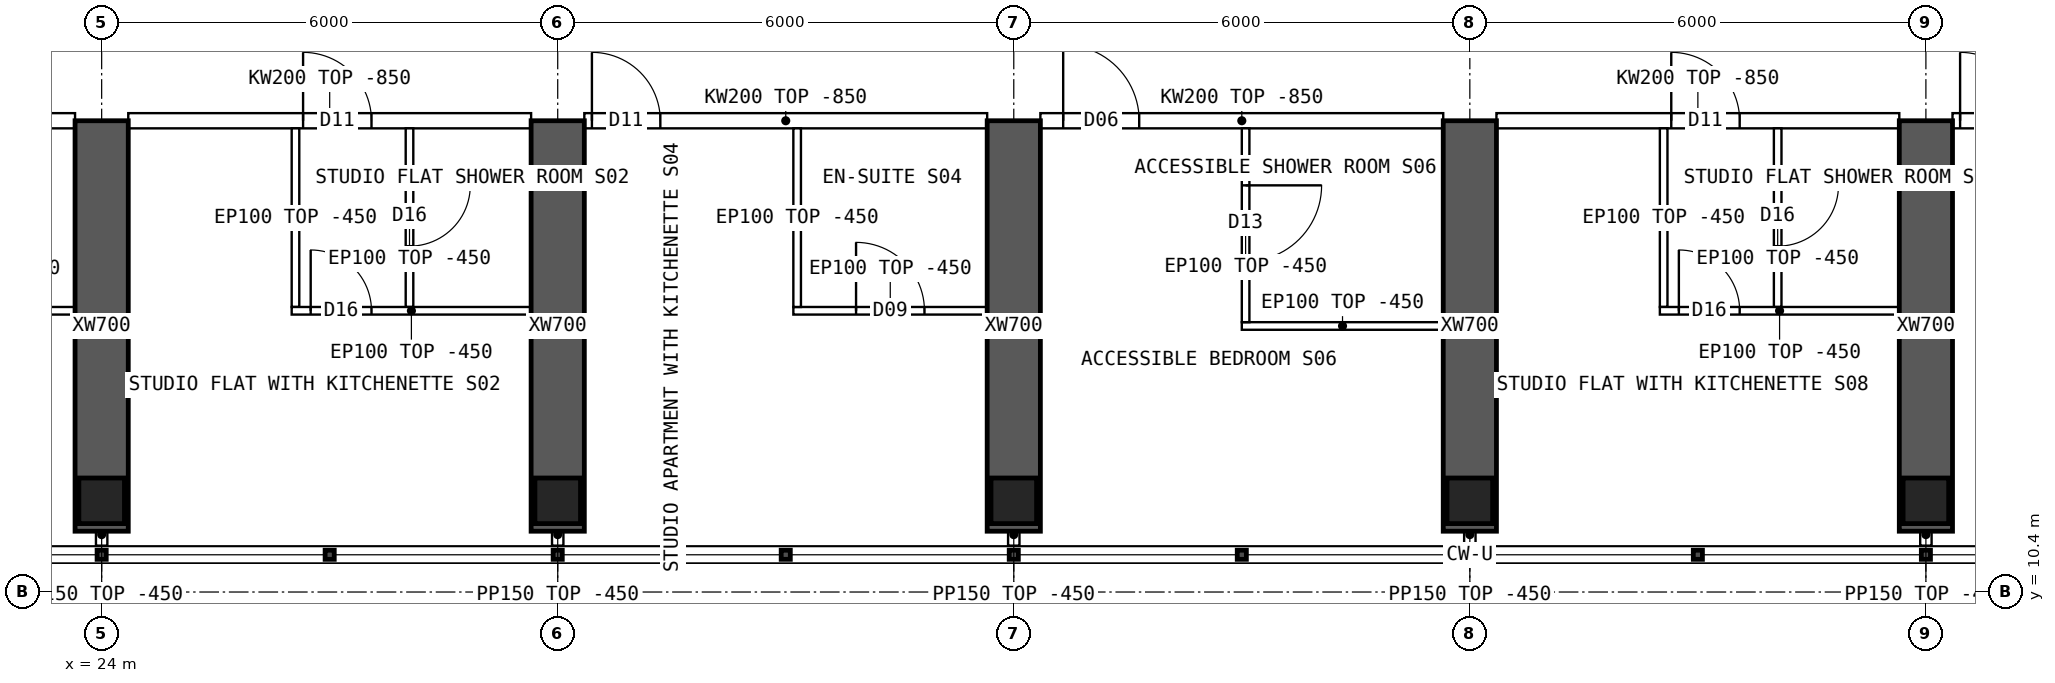
"""IFC4 building model, lengths in metres.
Left out: names, types, materials, properties, quantities, classifications, styles, units other than length and angle.
Written with IfcOpenShell. Run it as: python <this file> out.ifc"""

import sys

from ifc_helpers import new_model, si_unit, direction, frame, frame_2d, origin, origin_2d, place, context, subcontext, project, spatial, polyline, rectangle, hollow_rectangle, outline, extrude, element, fill, save


model = new_model("IFC4")
c1 = context("Model", 3, precision=1e-05, world=origin(), true_north=direction((0.0, 1.0)))
c2 = subcontext(c1, "Body", "Model", "MODEL_VIEW")
j1 = project(units=[si_unit("LENGTHUNIT", "METRE"), si_unit("PLANEANGLEUNIT", "RADIAN")], contexts=[c1])
p1 = place(None, origin())
s1 = spatial("IfcSite", under=j1, at=p1, CompositionType="ELEMENT")
p2 = place(p1, origin())
s2 = spatial("IfcBuilding", under=s1, at=p2, CompositionType="ELEMENT")
p3 = place(p2, frame((0.0, 0.0, 212.8)))
s3 = spatial("IfcBuildingStorey", under=s2, at=p3, CompositionType="ELEMENT", Elevation=212.8)
for number, where, z_axis, x_axis in (
    (1, (24.0, 11.6, 0.0), (0.0, 0.0, 1.0), (1.0, 0.0, 0.0)),
    (2, (30.0, 11.6, 0.0), (0.0, 0.0, 1.0), (1.0, 0.0, 0.0)),
    (3, (36.0, 11.6, 0.0), (0.0, 0.0, 1.0), (1.0, 0.0, 0.0)),
    (4, (42.0, 11.6, 0.0), (0.0, 0.0, 1.0), (1.0, 0.0, 0.0)),
    (5, (48.0, 11.6, 0.0), (0.0, 0.0, 1.0), (1.0, 0.0, 0.0)),
):
    element("IfcColumn", number, at=place(p3, frame(where, z_axis=z_axis, x_axis=x_axis)), inside=s3, PredefinedType="COLUMN", context=c2, shape_type="SweptSolid", body=[
        extrude(hollow_rectangle(XDim=0.6, YDim=0.6, WallThickness=0.06, at=origin_2d()), origin(), (0.0, 0.0, 1.0), 3.75),
    ])
for number, where, z_axis, x_axis in (
    (6, (24.0, 11.2, 0.0), (0.0, 0.0, 1.0), (0.0, 1.0, 0.0)),
    (7, (30.0, 11.2, 0.0), (0.0, 0.0, 1.0), (0.0, 1.0, 0.0)),
    (8, (36.0, 11.2, 0.0), (0.0, 0.0, 1.0), (0.0, 1.0, 0.0)),
    (9, (42.0, 11.2, 0.0), (0.0, 0.0, 1.0), (0.0, 1.0, 0.0)),
    (10, (48.0, 11.2, 0.0), (0.0, 0.0, 1.0), (0.0, 1.0, 0.0)),
):
    element("IfcWall", number, at=place(p3, frame(where, z_axis=z_axis, x_axis=x_axis)), inside=s3, PredefinedType="SHEAR", context=c2, shape_type="SweptSolid", body=[
        extrude(rectangle(XDim=5.4, YDim=0.7, at=frame_2d((2.7, 0.0))), origin(), (0.0, 0.0, 1.0), 3.75),
    ])
p4 = place(p3, frame((18.35, 16.6, 0.0), z_axis=(0.0, 0.0, 1.0), x_axis=(1.0, 0.0, 0.0)))
e11 = element("IfcWall", 11, at=p4, inside=s3, PredefinedType="SOLIDWALL", context=c2, shape_type="SweptSolid", body=[
    extrude(outline(polyline([(0.0, 0.0), (5.3, 0.0), (5.3, 2.9), (0.0, 2.9), (0.0, 0.0)])), frame((0.0, 0.1, 0.0), z_axis=(0.0, -1.0, 0.0), x_axis=(1.0, 0.0, 0.0)), (0.0, 0.0, 1.0), 0.2),
])
p5 = place(p4, frame((0.1, 0.0, 0.0)))
e12 = element("IfcOpeningElement", 12, at=p5, cuts=e11, PredefinedType="OPENING", context=c2, shape_type="SweptSolid", body=[
    extrude(rectangle(XDim=0.9, YDim=2.1, at=frame_2d((0.45, 1.05))), frame((0.0, 0.11, 0.0), z_axis=(0.0, -1.0, 0.0), x_axis=(1.0, 0.0, 0.0)), (0.0, 0.0, 1.0), 0.22),
])
p6 = place(p3, frame((24.35, 16.6, 0.0), z_axis=(0.0, 0.0, 1.0), x_axis=(1.0, 0.0, 0.0)))
e13 = element("IfcWall", 13, at=p6, inside=s3, PredefinedType="SOLIDWALL", context=c2, shape_type="SweptSolid", body=[
    extrude(outline(polyline([(0.0, 0.0), (5.3, 0.0), (5.3, 2.9), (0.0, 2.9), (0.0, 0.0)])), frame((0.0, 0.1, 0.0), z_axis=(0.0, -1.0, 0.0), x_axis=(1.0, 0.0, 0.0)), (0.0, 0.0, 1.0), 0.2),
])
p7 = place(p6, frame((2.3, 0.0, 0.0)))
e14 = element("IfcOpeningElement", 14, at=p7, cuts=e13, PredefinedType="OPENING", context=c2, shape_type="SweptSolid", body=[
    extrude(rectangle(XDim=0.9, YDim=2.1, at=frame_2d((0.45, 1.05))), frame((0.0, 0.11, 0.0), z_axis=(0.0, -1.0, 0.0), x_axis=(1.0, 0.0, 0.0)), (0.0, 0.0, 1.0), 0.22),
])
p8 = place(p3, frame((30.35, 16.6, 0.0), z_axis=(0.0, 0.0, 1.0), x_axis=(1.0, 0.0, 0.0)))
e15 = element("IfcWall", 15, at=p8, inside=s3, PredefinedType="SOLIDWALL", context=c2, shape_type="SweptSolid", body=[
    extrude(outline(polyline([(0.0, 0.0), (5.3, 0.0), (5.3, 2.9), (0.0, 2.9), (0.0, 0.0)])), frame((0.0, 0.1, 0.0), z_axis=(0.0, -1.0, 0.0), x_axis=(1.0, 0.0, 0.0)), (0.0, 0.0, 1.0), 0.2),
])
p9 = place(p8, frame((0.1, 0.0, 0.0)))
e16 = element("IfcOpeningElement", 16, at=p9, cuts=e15, PredefinedType="OPENING", context=c2, shape_type="SweptSolid", body=[
    extrude(rectangle(XDim=0.9, YDim=2.1, at=frame_2d((0.45, 1.05))), frame((0.0, 0.11, 0.0), z_axis=(0.0, -1.0, 0.0), x_axis=(1.0, 0.0, 0.0)), (0.0, 0.0, 1.0), 0.22),
])
p10 = place(p3, frame((36.35, 16.6, 0.0), z_axis=(0.0, 0.0, 1.0), x_axis=(1.0, 0.0, 0.0)))
e17 = element("IfcWall", 17, at=p10, inside=s3, PredefinedType="SOLIDWALL", context=c2, shape_type="SweptSolid", body=[
    extrude(outline(polyline([(0.0, 0.0), (5.3, 0.0), (5.3, 2.9), (0.0, 2.9), (0.0, 0.0)])), frame((0.0, 0.1, 0.0), z_axis=(0.0, -1.0, 0.0), x_axis=(1.0, 0.0, 0.0)), (0.0, 0.0, 1.0), 0.2),
])
p11 = place(p10, frame((0.3, 0.0, 0.0)))
e18 = element("IfcOpeningElement", 18, at=p11, cuts=e17, PredefinedType="OPENING", context=c2, shape_type="SweptSolid", body=[
    extrude(rectangle(XDim=1.0, YDim=2.1, at=frame_2d((0.5, 1.05))), frame((0.0, 0.11, 0.0), z_axis=(0.0, -1.0, 0.0), x_axis=(1.0, 0.0, 0.0)), (0.0, 0.0, 1.0), 0.22),
])
p12 = place(p3, frame((42.35, 16.6, 0.0), z_axis=(0.0, 0.0, 1.0), x_axis=(1.0, 0.0, 0.0)))
e19 = element("IfcWall", 19, at=p12, inside=s3, PredefinedType="SOLIDWALL", context=c2, shape_type="SweptSolid", body=[
    extrude(outline(polyline([(0.0, 0.0), (5.3, 0.0), (5.3, 2.9), (0.0, 2.9), (0.0, 0.0)])), frame((0.0, 0.1, 0.0), z_axis=(0.0, -1.0, 0.0), x_axis=(1.0, 0.0, 0.0)), (0.0, 0.0, 1.0), 0.2),
])
p13 = place(p12, frame((2.3, 0.0, 0.0)))
e20 = element("IfcOpeningElement", 20, at=p13, cuts=e19, PredefinedType="OPENING", context=c2, shape_type="SweptSolid", body=[
    extrude(rectangle(XDim=0.9, YDim=2.1, at=frame_2d((0.45, 1.05))), frame((0.0, 0.11, 0.0), z_axis=(0.0, -1.0, 0.0), x_axis=(1.0, 0.0, 0.0)), (0.0, 0.0, 1.0), 0.22),
])
p14 = place(p3, frame((48.35, 16.6, 0.0), z_axis=(0.0, 0.0, 1.0), x_axis=(1.0, 0.0, 0.0)))
e21 = element("IfcWall", 21, at=p14, inside=s3, PredefinedType="SOLIDWALL", context=c2, shape_type="SweptSolid", body=[
    extrude(outline(polyline([(0.0, 0.0), (5.3, 0.0), (5.3, 2.9), (0.0, 2.9), (0.0, 0.0)])), frame((0.0, 0.1, 0.0), z_axis=(0.0, -1.0, 0.0), x_axis=(1.0, 0.0, 0.0)), (0.0, 0.0, 1.0), 0.2),
])
p15 = place(p14, frame((0.1, 0.0, 0.0)))
e22 = element("IfcOpeningElement", 22, at=p15, cuts=e21, PredefinedType="OPENING", context=c2, shape_type="SweptSolid", body=[
    extrude(rectangle(XDim=0.9, YDim=2.1, at=frame_2d((0.45, 1.05))), frame((0.0, 0.11, 0.0), z_axis=(0.0, -1.0, 0.0), x_axis=(1.0, 0.0, 0.0)), (0.0, 0.0, 1.0), 0.22),
])
p16 = place(p3, frame((23.65, 14.1, 0.0), z_axis=(0.0, 0.0, 1.0), x_axis=(-1.0, 0.0, 0.0)))
e23 = element("IfcWall", 23, at=p16, inside=s3, PredefinedType="PARTITIONING", context=c2, shape_type="SweptSolid", body=[
    extrude(rectangle(XDim=2.55, YDim=0.1, at=frame_2d((1.275, 0.0))), origin(), (0.0, 0.0, 1.0), 3.3),
])
p17 = place(p16, frame((0.825, 0.0, 0.0)))
e24 = element("IfcOpeningElement", 24, at=p17, cuts=e23, PredefinedType="OPENING", context=c2, shape_type="SweptSolid", body=[
    extrude(rectangle(XDim=0.9, YDim=2.1, at=frame_2d((0.45, 1.05))), frame((0.0, 0.06, 0.0), z_axis=(0.0, -1.0, 0.0), x_axis=(1.0, 0.0, 0.0)), (0.0, 0.0, 1.0), 0.12),
])
p18 = place(p3, frame((29.65, 14.1, 0.0), z_axis=(0.0, 0.0, 1.0), x_axis=(-1.0, 0.0, 0.0)))
e25 = element("IfcWall", 25, at=p18, inside=s3, PredefinedType="PARTITIONING", context=c2, shape_type="SweptSolid", body=[
    extrude(rectangle(XDim=3.15, YDim=0.1, at=frame_2d((1.575, 0.0))), origin(), (0.0, 0.0, 1.0), 3.3),
])
p19 = place(p18, frame((2.1, 0.0, 0.0)))
e26 = element("IfcOpeningElement", 26, at=p19, cuts=e25, PredefinedType="OPENING", context=c2, shape_type="SweptSolid", body=[
    extrude(rectangle(XDim=0.8, YDim=2.1, at=frame_2d((0.4, 1.05))), frame((0.0, 0.06, 0.0), z_axis=(0.0, -1.0, 0.0), x_axis=(1.0, 0.0, 0.0)), (0.0, 0.0, 1.0), 0.12),
])
p20 = place(p3, frame((26.55, 14.15, 0.0), z_axis=(0.0, 0.0, 1.0), x_axis=(0.0, 1.0, 0.0)))
e27 = element("IfcWall", 27, at=p20, inside=s3, PredefinedType="PARTITIONING", context=c2, shape_type="SweptSolid", body=[
    extrude(outline(polyline([(0.0, 0.0), (2.35, 0.0), (2.35, 2.9), (2.302, 2.9), (2.3, 3.3), (0.0, 3.3), (0.0, 0.0)])), frame((0.0, 0.05, 0.0), z_axis=(0.0, -1.0, 0.0), x_axis=(1.0, 0.0, 0.0)), (0.0, 0.0, 1.0), 0.1),
])
p21 = place(p3, frame((28.05, 14.15, 0.0), z_axis=(0.0, 0.0, 1.0), x_axis=(0.0, 1.0, 0.0)))
e28 = element("IfcWall", 28, at=p21, inside=s3, PredefinedType="PARTITIONING", context=c2, shape_type="SweptSolid", body=[
    extrude(outline(polyline([(0.0, 0.0), (2.35, 0.0), (2.35, 2.9), (2.302, 2.9), (2.3, 3.3), (0.0, 3.3), (0.0, 0.0)])), frame((0.0, 0.05, 0.0), z_axis=(0.0, -1.0, 0.0), x_axis=(1.0, 0.0, 0.0)), (0.0, 0.0, 1.0), 0.1),
])
p22 = place(p21, frame((0.8, 0.0, 0.0)))
e29 = element("IfcOpeningElement", 29, at=p22, cuts=e28, PredefinedType="OPENING", context=c2, shape_type="SweptSolid", body=[
    extrude(rectangle(XDim=0.8, YDim=2.1, at=frame_2d((0.4, 1.05))), frame((0.0, 0.06, 0.0), z_axis=(0.0, -1.0, 0.0), x_axis=(1.0, 0.0, 0.0)), (0.0, 0.0, 1.0), 0.12),
])
p23 = place(p3, frame((35.65, 14.1, 0.0), z_axis=(0.0, 0.0, 1.0), x_axis=(-1.0, 0.0, 0.0)))
e30 = element("IfcWall", 30, at=p23, inside=s3, PredefinedType="PARTITIONING", context=c2, shape_type="SweptSolid", body=[
    extrude(rectangle(XDim=2.55, YDim=0.1, at=frame_2d((1.275, 0.0))), origin(), (0.0, 0.0, 1.0), 3.3),
])
p24 = place(p23, frame((0.825, 0.0, 0.0)))
e31 = element("IfcOpeningElement", 31, at=p24, cuts=e30, PredefinedType="OPENING", context=c2, shape_type="SweptSolid", body=[
    extrude(rectangle(XDim=0.9, YDim=2.1, at=frame_2d((0.45, 1.05))), frame((0.0, 0.06, 0.0), z_axis=(0.0, -1.0, 0.0), x_axis=(1.0, 0.0, 0.0)), (0.0, 0.0, 1.0), 0.12),
])
p25 = place(p3, frame((33.15, 14.15, 0.0), z_axis=(0.0, 0.0, 1.0), x_axis=(0.0, 1.0, 0.0)))
e32 = element("IfcWall", 32, at=p25, inside=s3, PredefinedType="PARTITIONING", context=c2, shape_type="SweptSolid", body=[
    extrude(outline(polyline([(0.0, 0.0), (2.35, 0.0), (2.35, 2.9), (2.302, 2.9), (2.3, 3.3), (0.0, 3.3), (0.0, 0.0)])), frame((0.0, 0.05, 0.0), z_axis=(0.0, -1.0, 0.0), x_axis=(1.0, 0.0, 0.0)), (0.0, 0.0, 1.0), 0.1),
])
p26 = place(p3, frame((39.0, 13.9, 0.0), z_axis=(0.0, 0.0, 1.0), x_axis=(1.0, 0.0, 0.0)))
e33 = element("IfcWall", 33, at=p26, inside=s3, PredefinedType="PARTITIONING", context=c2, shape_type="SweptSolid", body=[
    extrude(rectangle(XDim=2.65, YDim=0.1, at=frame_2d((1.325, 0.0))), origin(), (0.0, 0.0, 1.0), 3.3),
])
p27 = place(p3, frame((39.05, 13.95, 0.0), z_axis=(0.0, 0.0, 1.0), x_axis=(0.0, 1.0, 0.0)))
e34 = element("IfcWall", 34, at=p27, inside=s3, PredefinedType="PARTITIONING", context=c2, shape_type="SweptSolid", body=[
    extrude(outline(polyline([(0.0, 0.0), (2.55, 0.0), (2.55, 2.9), (2.502, 2.9), (2.5, 3.3), (0.0, 3.3), (0.0, 0.0)])), frame((0.0, 0.05, 0.0), z_axis=(0.0, -1.0, 0.0), x_axis=(1.0, 0.0, 0.0)), (0.0, 0.0, 1.0), 0.1),
])
p28 = place(p27, frame((0.8, 0.0, 0.0)))
e35 = element("IfcOpeningElement", 35, at=p28, cuts=e34, PredefinedType="OPENING", context=c2, shape_type="SweptSolid", body=[
    extrude(rectangle(XDim=1.0, YDim=2.1, at=frame_2d((0.5, 1.05))), frame((0.0, 0.06, 0.0), z_axis=(0.0, -1.0, 0.0), x_axis=(1.0, 0.0, 0.0)), (0.0, 0.0, 1.0), 0.12),
])
p29 = place(p3, frame((47.65, 14.1, 0.0), z_axis=(0.0, 0.0, 1.0), x_axis=(-1.0, 0.0, 0.0)))
e36 = element("IfcWall", 36, at=p29, inside=s3, PredefinedType="PARTITIONING", context=c2, shape_type="SweptSolid", body=[
    extrude(rectangle(XDim=3.15, YDim=0.1, at=frame_2d((1.575, 0.0))), origin(), (0.0, 0.0, 1.0), 3.3),
])
p30 = place(p29, frame((2.1, 0.0, 0.0)))
e37 = element("IfcOpeningElement", 37, at=p30, cuts=e36, PredefinedType="OPENING", context=c2, shape_type="SweptSolid", body=[
    extrude(rectangle(XDim=0.8, YDim=2.1, at=frame_2d((0.4, 1.05))), frame((0.0, 0.06, 0.0), z_axis=(0.0, -1.0, 0.0), x_axis=(1.0, 0.0, 0.0)), (0.0, 0.0, 1.0), 0.12),
])
p31 = place(p3, frame((44.55, 14.15, 0.0), z_axis=(0.0, 0.0, 1.0), x_axis=(0.0, 1.0, 0.0)))
e38 = element("IfcWall", 38, at=p31, inside=s3, PredefinedType="PARTITIONING", context=c2, shape_type="SweptSolid", body=[
    extrude(outline(polyline([(0.0, 0.0), (2.35, 0.0), (2.35, 2.9), (2.302, 2.9), (2.3, 3.3), (0.0, 3.3), (0.0, 0.0)])), frame((0.0, 0.05, 0.0), z_axis=(0.0, -1.0, 0.0), x_axis=(1.0, 0.0, 0.0)), (0.0, 0.0, 1.0), 0.1),
])
p32 = place(p3, frame((46.05, 14.15, 0.0), z_axis=(0.0, 0.0, 1.0), x_axis=(0.0, 1.0, 0.0)))
e39 = element("IfcWall", 39, at=p32, inside=s3, PredefinedType="PARTITIONING", context=c2, shape_type="SweptSolid", body=[
    extrude(outline(polyline([(0.0, 0.0), (2.35, 0.0), (2.35, 2.9), (2.302, 2.9), (2.3, 3.3), (0.0, 3.3), (0.0, 0.0)])), frame((0.0, 0.05, 0.0), z_axis=(0.0, -1.0, 0.0), x_axis=(1.0, 0.0, 0.0)), (0.0, 0.0, 1.0), 0.1),
])
p33 = place(p32, frame((0.8, 0.0, 0.0)))
e40 = element("IfcOpeningElement", 40, at=p33, cuts=e39, PredefinedType="OPENING", context=c2, shape_type="SweptSolid", body=[
    extrude(rectangle(XDim=0.8, YDim=2.1, at=frame_2d((0.4, 1.05))), frame((0.0, 0.06, 0.0), z_axis=(0.0, -1.0, 0.0), x_axis=(1.0, 0.0, 0.0)), (0.0, 0.0, 1.0), 0.12),
])
for number, where, z_axis, x_axis in (
    (41, (24.0, 11.3, 0.0), (0.0, 0.0, 1.0), (0.0, -1.0, 0.0)),
    (42, (30.0, 11.3, 0.0), (0.0, 0.0, 1.0), (0.0, -1.0, 0.0)),
    (43, (36.0, 11.3, 0.0), (0.0, 0.0, 1.0), (0.0, -1.0, 0.0)),
    (44, (42.0, 11.3, 0.0), (0.0, 0.0, 1.0), (0.0, -1.0, 0.0)),
    (45, (48.0, 11.3, 0.0), (0.0, 0.0, 1.0), (0.0, -1.0, 0.0)),
):
    element("IfcWall", number, at=place(p3, frame(where, z_axis=z_axis, x_axis=x_axis)), inside=s3, PredefinedType="PARTITIONING", context=c2, shape_type="SweptSolid", body=[
        extrude(rectangle(XDim=0.29, YDim=0.15, at=frame_2d((0.145, 0.0))), origin(), (0.0, 0.0, 1.0), 3.3),
    ])
p34 = place(p19, origin())
e46 = element("IfcDoor", 46, at=p34, inside=s3, OperationType="SINGLE_SWING_RIGHT", PredefinedType="DOOR", context=c2, shape_type="SweptSolid", body=[
    extrude(rectangle(XDim=0.8, YDim=2.1, at=frame_2d((0.4, 1.05))), frame((0.0, 0.025, 0.0), z_axis=(0.0, -1.0, 0.0), x_axis=(1.0, 0.0, 0.0)), (0.0, 0.0, 1.0), 0.05),
])
fill(e26, e46)
p35 = place(p22, origin())
e47 = element("IfcDoor", 47, at=p35, inside=s3, OperationType="SINGLE_SWING_RIGHT", PredefinedType="DOOR", context=c2, shape_type="SweptSolid", body=[
    extrude(rectangle(XDim=0.8, YDim=2.1, at=frame_2d((0.4, 1.05))), frame((0.0, 0.025, 0.0), z_axis=(0.0, -1.0, 0.0), x_axis=(1.0, 0.0, 0.0)), (0.0, 0.0, 1.0), 0.05),
])
fill(e29, e47)
p36 = place(p7, origin())
e48 = element("IfcDoor", 48, at=p36, inside=s3, OperationType="SINGLE_SWING_LEFT", PredefinedType="DOOR", context=c2, shape_type="SweptSolid", body=[
    extrude(rectangle(XDim=0.9, YDim=2.1, at=frame_2d((0.45, 1.05))), frame((0.0, 0.025, 0.0), z_axis=(0.0, -1.0, 0.0), x_axis=(1.0, 0.0, 0.0)), (0.0, 0.0, 1.0), 0.05),
])
fill(e14, e48)
p37 = place(p24, origin())
e49 = element("IfcDoor", 49, at=p37, inside=s3, OperationType="SINGLE_SWING_RIGHT", PredefinedType="DOOR", context=c2, shape_type="SweptSolid", body=[
    extrude(rectangle(XDim=0.9, YDim=2.1, at=frame_2d((0.45, 1.05))), frame((0.0, 0.025, 0.0), z_axis=(0.0, -1.0, 0.0), x_axis=(1.0, 0.0, 0.0)), (0.0, 0.0, 1.0), 0.05),
])
fill(e31, e49)
p38 = place(p9, origin())
e50 = element("IfcDoor", 50, at=p38, inside=s3, OperationType="SINGLE_SWING_LEFT", PredefinedType="DOOR", context=c2, shape_type="SweptSolid", body=[
    extrude(rectangle(XDim=0.9, YDim=2.1, at=frame_2d((0.45, 1.05))), frame((0.0, 0.025, 0.0), z_axis=(0.0, -1.0, 0.0), x_axis=(1.0, 0.0, 0.0)), (0.0, 0.0, 1.0), 0.05),
])
fill(e16, e50)
p39 = place(p28, origin())
e51 = element("IfcDoor", 51, at=p39, inside=s3, OperationType="SINGLE_SWING_RIGHT", PredefinedType="DOOR", context=c2, shape_type="SweptSolid", body=[
    extrude(rectangle(XDim=1.0, YDim=2.1, at=frame_2d((0.5, 1.05))), frame((0.0, 0.025, 0.0), z_axis=(0.0, -1.0, 0.0), x_axis=(1.0, 0.0, 0.0)), (0.0, 0.0, 1.0), 0.05),
])
fill(e35, e51)
p40 = place(p11, origin())
e52 = element("IfcDoor", 52, at=p40, inside=s3, OperationType="SINGLE_SWING_LEFT", PredefinedType="DOOR", context=c2, shape_type="SweptSolid", body=[
    extrude(rectangle(XDim=1.0, YDim=2.1, at=frame_2d((0.5, 1.05))), frame((0.0, 0.025, 0.0), z_axis=(0.0, -1.0, 0.0), x_axis=(1.0, 0.0, 0.0)), (0.0, 0.0, 1.0), 0.05),
])
fill(e18, e52)
p41 = place(p30, origin())
e53 = element("IfcDoor", 53, at=p41, inside=s3, OperationType="SINGLE_SWING_RIGHT", PredefinedType="DOOR", context=c2, shape_type="SweptSolid", body=[
    extrude(rectangle(XDim=0.8, YDim=2.1, at=frame_2d((0.4, 1.05))), frame((0.0, 0.025, 0.0), z_axis=(0.0, -1.0, 0.0), x_axis=(1.0, 0.0, 0.0)), (0.0, 0.0, 1.0), 0.05),
])
fill(e37, e53)
p42 = place(p33, origin())
e54 = element("IfcDoor", 54, at=p42, inside=s3, OperationType="SINGLE_SWING_RIGHT", PredefinedType="DOOR", context=c2, shape_type="SweptSolid", body=[
    extrude(rectangle(XDim=0.8, YDim=2.1, at=frame_2d((0.4, 1.05))), frame((0.0, 0.025, 0.0), z_axis=(0.0, -1.0, 0.0), x_axis=(1.0, 0.0, 0.0)), (0.0, 0.0, 1.0), 0.05),
])
fill(e40, e54)
p43 = place(p13, origin())
e55 = element("IfcDoor", 55, at=p43, inside=s3, OperationType="SINGLE_SWING_LEFT", PredefinedType="DOOR", context=c2, shape_type="SweptSolid", body=[
    extrude(rectangle(XDim=0.9, YDim=2.1, at=frame_2d((0.45, 1.05))), frame((0.0, 0.025, 0.0), z_axis=(0.0, -1.0, 0.0), x_axis=(1.0, 0.0, 0.0)), (0.0, 0.0, 1.0), 0.05),
])
fill(e20, e55)
p44 = place(p15, origin())
e56 = element("IfcDoor", 56, at=p44, inside=s3, OperationType="SINGLE_SWING_LEFT", PredefinedType="DOOR", context=c2, shape_type="SweptSolid", body=[
    extrude(rectangle(XDim=0.9, YDim=2.1, at=frame_2d((0.45, 1.05))), frame((0.0, 0.025, 0.0), z_axis=(0.0, -1.0, 0.0), x_axis=(1.0, 0.0, 0.0)), (0.0, 0.0, 1.0), 0.05),
])
fill(e22, e56)
save(model, sys.argv[1])
